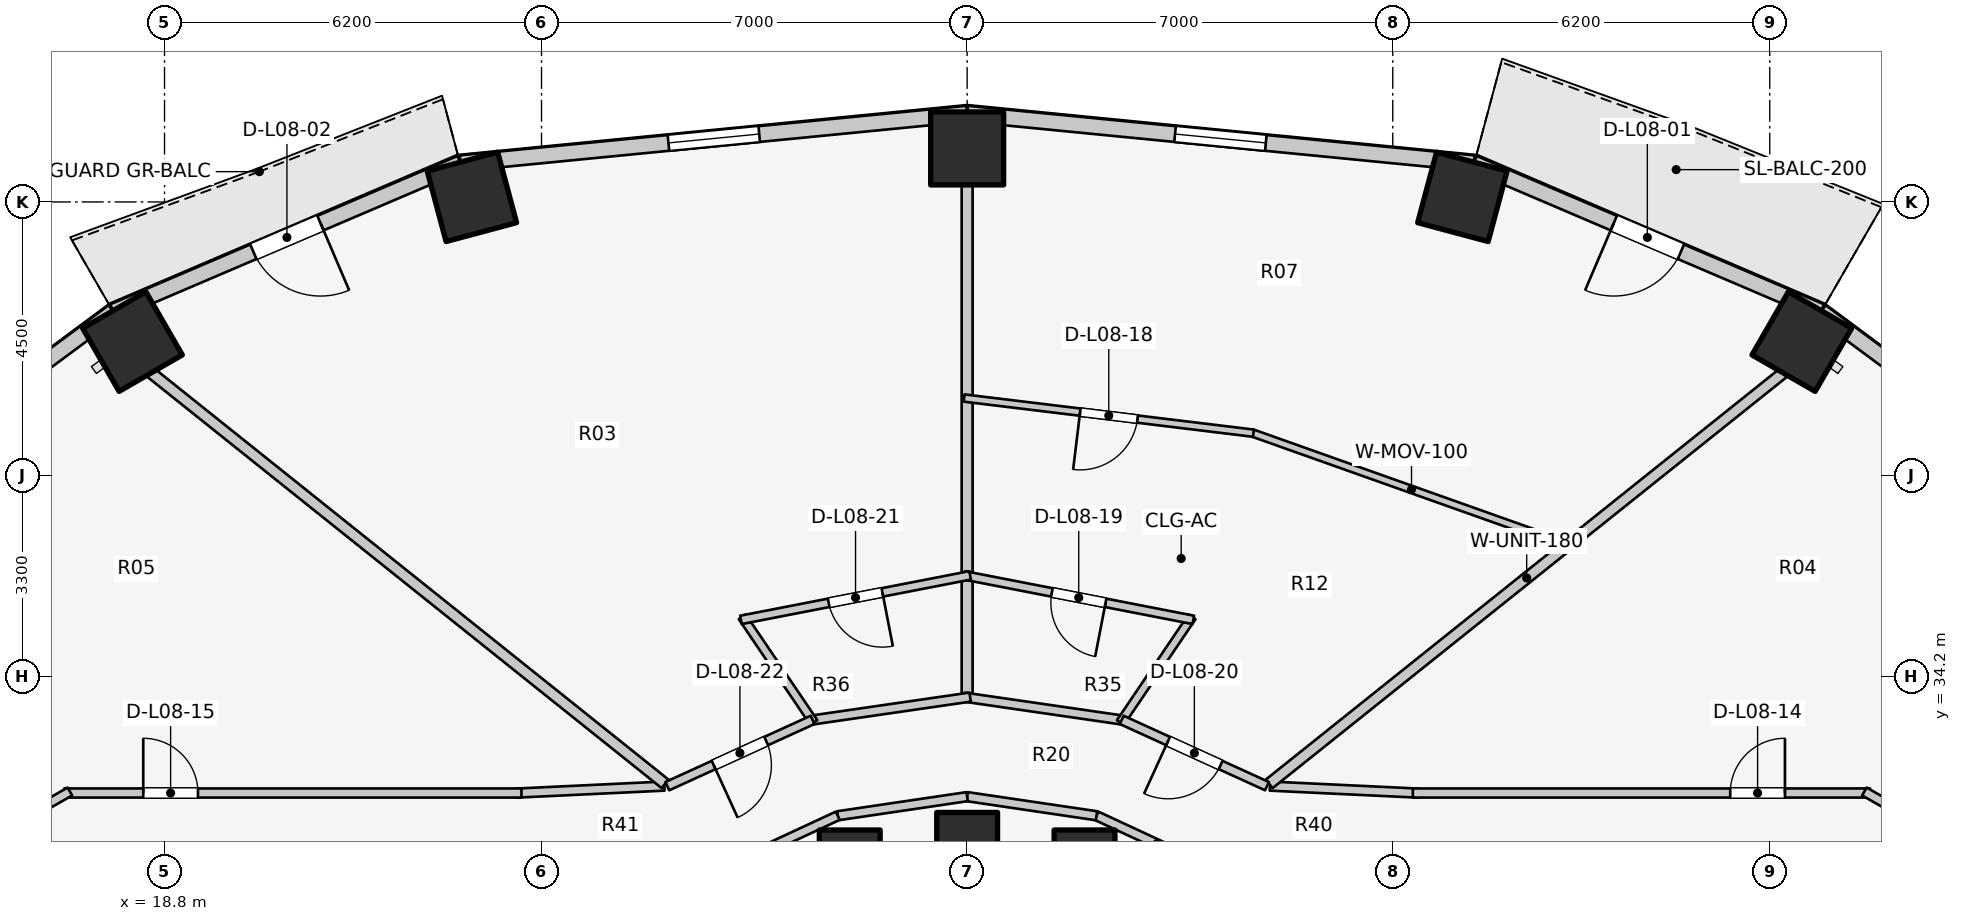
"""IFC4 building model, lengths in metres.
Left out: names, types, materials, properties, quantities, classifications, styles, units other than length and angle.
Written with IfcOpenShell. Run it as: python <this file> out.ifc"""

import sys

from ifc_helpers import new_model, si_unit, direction, frame, frame_2d, origin, origin_2d, place, context, subcontext, project, spatial, rectangle, extrude, element, fill, save


model = new_model("IFC4")
c1 = context("Model", 3, precision=1e-05, world=origin(), true_north=direction((0.0, 1.0)))
c2 = subcontext(c1, "Body", "Model", "MODEL_VIEW")
j1 = project(units=[si_unit("LENGTHUNIT", "METRE"), si_unit("PLANEANGLEUNIT", "RADIAN")], contexts=[c1])
p1 = place(None, origin())
s1 = spatial("IfcSite", under=j1, at=p1, CompositionType="ELEMENT")
p2 = place(p1, origin())
s2 = spatial("IfcBuilding", under=s1, at=p2, CompositionType="ELEMENT")
p3 = place(p2, frame((0.0, 0.0, 30.7)))
s3 = spatial("IfcBuildingStorey", under=s2, at=p3, CompositionType="ELEMENT", Elevation=30.7)
p4 = place(p3, frame((45.727, 39.704, 0.0), z_axis=(0.0, 0.0, 1.0), x_axis=(0.5, 0.866025403784, 0.0)))
e1 = element("IfcColumn", 1, at=p4, inside=s3, PredefinedType="COLUMN", context=c2, shape_type="SweptSolid", body=[
    extrude(rectangle(XDim=1.2, YDim=1.2, at=origin_2d()), origin(), (0.0, 0.0, 1.0), 3.1),
])
p5 = place(p3, frame((33.931, 31.172, 0.0), z_axis=(0.0, 0.0, 1.0), x_axis=(1.0, 0.0, 0.0)))
e2 = element("IfcColumn", 2, at=p5, inside=s3, PredefinedType="COLUMN", context=c2, shape_type="SweptSolid", body=[
    extrude(rectangle(XDim=1.0, YDim=1.0, at=origin_2d()), origin(), (0.0, 0.0, 1.0), 3.1),
])
p6 = place(p3, frame((40.145, 42.084, 0.0), z_axis=(0.0, 0.0, 1.0), x_axis=(0.258819045103, 0.965925826289, 0.0)))
e3 = element("IfcColumn", 3, at=p6, inside=s3, PredefinedType="COLUMN", context=c2, shape_type="SweptSolid", body=[
    extrude(rectangle(XDim=1.2, YDim=1.2, at=origin_2d()), origin(), (0.0, 0.0, 1.0), 3.1),
])
p7 = place(p3, frame((32.0, 31.46, 0.0), z_axis=(0.0, 0.0, 1.0), x_axis=(1.0, 0.0, 0.0)))
e4 = element("IfcColumn", 4, at=p7, inside=s3, PredefinedType="COLUMN", context=c2, shape_type="SweptSolid", body=[
    extrude(rectangle(XDim=1.0, YDim=1.0, at=origin_2d()), origin(), (0.0, 0.0, 1.0), 3.1),
])
p8 = place(p3, frame((32.0, 42.88, 0.0), z_axis=(0.0, 0.0, 1.0), x_axis=(0.0, 1.0, 0.0)))
e5 = element("IfcColumn", 5, at=p8, inside=s3, PredefinedType="COLUMN", context=c2, shape_type="SweptSolid", body=[
    extrude(rectangle(XDim=1.2, YDim=1.2, at=origin_2d()), origin(), (0.0, 0.0, 1.0), 3.1),
])
p9 = place(p3, frame((30.069, 31.172, 0.0), z_axis=(0.0, 0.0, 1.0), x_axis=(1.0, 0.0, 0.0)))
e6 = element("IfcColumn", 6, at=p9, inside=s3, PredefinedType="COLUMN", context=c2, shape_type="SweptSolid", body=[
    extrude(rectangle(XDim=1.0, YDim=1.0, at=origin_2d()), origin(), (0.0, 0.0, 1.0), 3.1),
])
for number, where, z_axis, x_axis in (
    (7, (23.855, 42.084, 0.0), (0.0, 0.0, 1.0), (-0.259, 0.966, 0.0)),
    (8, (18.273, 39.704, 0.0), (0.0, 0.0, 1.0), (-0.5, 0.866, 0.0)),
):
    element("IfcColumn", number, at=place(p3, frame(where, z_axis=z_axis, x_axis=x_axis)), inside=s3, PredefinedType="COLUMN", context=c2, shape_type="SweptSolid", body=[
        extrude(rectangle(XDim=1.2, YDim=1.2, at=origin_2d()), origin(), (0.0, 0.0, 1.0), 3.1),
    ])
p10 = place(p3, frame((50.405, 36.965, 0.0), z_axis=(0.0, 0.0, 1.0), x_axis=(-0.803477531792, 0.595335078679, 0.0)))
e9 = element("IfcWall", 9, at=p10, inside=s3, PredefinedType="STANDARD", context=c2, shape_type="SweptSolid", body=[
    extrude(rectangle(XDim=5.43, YDim=0.26, at=frame_2d((2.715, 0.0))), origin(), (0.0, 0.0, 1.0), 2.85),
])
p11 = place(p3, frame((46.042, 40.197, 0.0), z_axis=(0.0, 0.0, 1.0), x_axis=(-0.919612132394, 0.39282760335, 0.0)))
e10 = element("IfcWall", 10, at=p11, inside=s3, PredefinedType="STANDARD", context=c2, shape_type="SweptSolid", body=[
    extrude(rectangle(XDim=6.209, YDim=0.26, at=frame_2d((3.105, 0.0))), origin(), (0.0, 0.0, 1.0), 2.88),
])
p12 = place(p11, frame((2.505, 0.0, 0.0)))
e11 = element("IfcOpeningElement", 11, at=p12, cuts=e10, PredefinedType="OPENING", context=c2, shape_type="SweptSolid", body=[
    extrude(rectangle(XDim=1.2, YDim=2.2, at=frame_2d((0.6, 1.1))), frame((0.0, 0.14, 0.0), z_axis=(0.0, -1.0, 0.0), x_axis=(1.0, 0.0, 0.0)), (0.0, 0.0, 1.0), 0.28),
])
p13 = place(p3, frame((40.332, 42.636, 0.0), z_axis=(0.0, 0.0, 1.0), x_axis=(-0.995247718352, 0.097375454379, 0.0)))
e12 = element("IfcWall", 12, at=p13, inside=s3, PredefinedType="STANDARD", context=c2, shape_type="SweptSolid", body=[
    extrude(rectangle(XDim=8.372, YDim=0.26, at=frame_2d((4.186, 0.0))), origin(), (0.0, 0.0, 1.0), 2.85),
])
p14 = place(p13, frame((3.436, 0.0, 0.75)))
e13 = element("IfcOpeningElement", 13, at=p14, cuts=e12, PredefinedType="OPENING", context=c2, shape_type="SweptSolid", body=[
    extrude(rectangle(XDim=1.5, YDim=1.6, at=frame_2d((0.75, 0.8))), frame((0.0, 0.14, 0.0), z_axis=(0.0, -1.0, 0.0), x_axis=(1.0, 0.0, 0.0)), (0.0, 0.0, 1.0), 0.28),
])
p15 = place(p3, frame((32.0, 43.451, 0.0), z_axis=(0.0, 0.0, 1.0), x_axis=(-0.995247718352, -0.097375454379, 0.0)))
e14 = element("IfcWall", 14, at=p15, inside=s3, PredefinedType="STANDARD", context=c2, shape_type="SweptSolid", body=[
    extrude(rectangle(XDim=8.372, YDim=0.26, at=frame_2d((4.186, 0.0))), origin(), (0.0, 0.0, 1.0), 2.85),
])
p16 = place(p15, frame((3.436, 0.0, 0.75)))
e15 = element("IfcOpeningElement", 15, at=p16, cuts=e14, PredefinedType="OPENING", context=c2, shape_type="SweptSolid", body=[
    extrude(rectangle(XDim=1.5, YDim=1.6, at=frame_2d((0.75, 0.8))), frame((0.0, 0.14, 0.0), z_axis=(0.0, -1.0, 0.0), x_axis=(1.0, 0.0, 0.0)), (0.0, 0.0, 1.0), 0.28),
])
p17 = place(p3, frame((23.668, 42.636, 0.0), z_axis=(0.0, 0.0, 1.0), x_axis=(-0.919612132394, -0.39282760335, 0.0)))
e16 = element("IfcWall", 16, at=p17, inside=s3, PredefinedType="STANDARD", context=c2, shape_type="SweptSolid", body=[
    extrude(rectangle(XDim=6.209, YDim=0.26, at=frame_2d((3.105, 0.0))), origin(), (0.0, 0.0, 1.0), 2.88),
])
p18 = place(p17, frame((2.505, 0.0, 0.0)))
e17 = element("IfcOpeningElement", 17, at=p18, cuts=e16, PredefinedType="OPENING", context=c2, shape_type="SweptSolid", body=[
    extrude(rectangle(XDim=1.2, YDim=2.2, at=frame_2d((0.6, 1.1))), frame((0.0, 0.14, 0.0), z_axis=(0.0, -1.0, 0.0), x_axis=(1.0, 0.0, 0.0)), (0.0, 0.0, 1.0), 0.28),
])
p19 = place(p3, frame((17.958, 40.197, 0.0), z_axis=(0.0, 0.0, 1.0), x_axis=(-0.803477531792, -0.595335078679, 0.0)))
e18 = element("IfcWall", 18, at=p19, inside=s3, PredefinedType="STANDARD", context=c2, shape_type="SweptSolid", body=[
    extrude(rectangle(XDim=5.43, YDim=0.26, at=frame_2d((2.715, 0.0))), origin(), (0.0, 0.0, 1.0), 2.85),
])
p20 = place(p3, frame((36.11, 30.985, 0.0), z_axis=(0.0, 0.0, 1.0), x_axis=(-0.906943449489, 0.421252393975, 0.0)))
e19 = element("IfcWall", 19, at=p20, inside=s3, PredefinedType="PARTITIONING", context=c2, shape_type="SweptSolid", body=[
    extrude(rectangle(XDim=2.186, YDim=0.15, at=frame_2d((1.093, 0.0))), origin(), (0.0, 0.0, 1.0), 2.237),
])
for number, where, z_axis, x_axis in (
    (20, (34.127, 31.906, 0.0), (0.0, 0.0, 1.0), (-0.989, 0.146, 0.0)),
    (21, (32.0, 32.22, 0.0), (0.0, 0.0, 1.0), (-0.989, -0.146, 0.0)),
):
    element("IfcWall", number, at=place(p3, frame(where, z_axis=z_axis, x_axis=x_axis)), inside=s3, PredefinedType="PARTITIONING", context=c2, shape_type="SweptSolid", body=[
        extrude(rectangle(XDim=2.151, YDim=0.15, at=frame_2d((1.075, 0.0))), origin(), (0.0, 0.0, 1.0), 2.237),
    ])
p21 = place(p3, frame((29.873, 31.906, 0.0), z_axis=(0.0, 0.0, 1.0), x_axis=(-0.906943449489, -0.421252393975, 0.0)))
e22 = element("IfcWall", 22, at=p21, inside=s3, PredefinedType="PARTITIONING", context=c2, shape_type="SweptSolid", body=[
    extrude(rectangle(XDim=2.186, YDim=0.15, at=frame_2d((1.093, 0.0))), origin(), (0.0, 0.0, 1.0), 2.237),
])
p22 = place(p3, frame((36.98, 32.394, 0.0), z_axis=(0.0, 0.0, 1.0), x_axis=(0.998877427952, -0.047369651964, 0.0)))
e23 = element("IfcWall", 23, at=p22, inside=s3, PredefinedType="PARTITIONING", context=c2, shape_type="SweptSolid", body=[
    extrude(rectangle(XDim=2.433, YDim=0.15, at=frame_2d((1.216, 0.0))), origin(), (0.0, 0.0, 1.0), 2.237),
])
p23 = place(p3, frame((39.33, 32.28, 0.0), z_axis=(0.0, 0.0, 1.0), x_axis=(1.0, 0.0, 0.0)))
e24 = element("IfcWall", 24, at=p23, inside=s3, PredefinedType="PARTITIONING", context=c2, shape_type="SweptSolid", body=[
    extrude(rectangle(XDim=7.52, YDim=0.15, at=frame_2d((3.76, 0.0))), origin(), (0.0, 0.0, 1.0), 2.237),
])
p24 = place(p23, frame((5.22, 0.0, 0.0)))
e25 = element("IfcOpeningElement", 25, at=p24, cuts=e24, PredefinedType="OPENING", context=c2, shape_type="SweptSolid", body=[
    extrude(rectangle(XDim=0.9, YDim=2.1, at=frame_2d((0.45, 1.05))), frame((0.0, 0.085, 0.0), z_axis=(0.0, -1.0, 0.0), x_axis=(1.0, 0.0, 0.0)), (0.0, 0.0, 1.0), 0.17),
])
p25 = place(p3, frame((46.757, 32.305, 0.0), z_axis=(0.0, 0.0, 1.0), x_axis=(0.867991349648, -0.496579315857, 0.0)))
e26 = element("IfcWall", 26, at=p25, inside=s3, PredefinedType="PARTITIONING", context=c2, shape_type="SweptSolid", body=[
    extrude(rectangle(XDim=2.567, YDim=0.15, at=frame_2d((1.283, 0.0))), origin(), (0.0, 0.0, 1.0), 2.069),
])
p26 = place(p3, frame((27.02, 32.394, 0.0), z_axis=(0.0, 0.0, 1.0), x_axis=(-0.998877427952, -0.047369651964, 0.0)))
e27 = element("IfcWall", 27, at=p26, inside=s3, PredefinedType="PARTITIONING", context=c2, shape_type="SweptSolid", body=[
    extrude(rectangle(XDim=2.433, YDim=0.15, at=frame_2d((1.216, 0.0))), origin(), (0.0, 0.0, 1.0), 2.237),
])
p27 = place(p3, frame((17.15, 32.28, 0.0), z_axis=(0.0, 0.0, 1.0), x_axis=(1.0, 0.0, 0.0)))
e28 = element("IfcWall", 28, at=p27, inside=s3, PredefinedType="PARTITIONING", context=c2, shape_type="SweptSolid", body=[
    extrude(rectangle(XDim=7.52, YDim=0.15, at=frame_2d((3.76, 0.0))), origin(), (0.0, 0.0, 1.0), 2.237),
])
p28 = place(p27, frame((1.3, 0.0, 0.0)))
e29 = element("IfcOpeningElement", 29, at=p28, cuts=e28, PredefinedType="OPENING", context=c2, shape_type="SweptSolid", body=[
    extrude(rectangle(XDim=0.9, YDim=2.1, at=frame_2d((0.45, 1.05))), frame((0.0, 0.085, 0.0), z_axis=(0.0, -1.0, 0.0), x_axis=(1.0, 0.0, 0.0)), (0.0, 0.0, 1.0), 0.17),
])
p29 = place(p3, frame((17.243, 32.305, 0.0), z_axis=(0.0, 0.0, 1.0), x_axis=(-0.867991349648, -0.496579315857, 0.0)))
e30 = element("IfcWall", 30, at=p29, inside=s3, PredefinedType="PARTITIONING", context=c2, shape_type="SweptSolid", body=[
    extrude(rectangle(XDim=2.567, YDim=0.15, at=frame_2d((1.283, 0.0))), origin(), (0.0, 0.0, 1.0), 2.069),
])
p30 = place(p3, frame((36.968, 32.431, 0.0), z_axis=(0.0, 0.0, 1.0), x_axis=(0.781055486744, 0.624461629428, 0.0)))
e31 = element("IfcWall", 31, at=p30, inside=s3, PredefinedType="PARTITIONING", context=c2, shape_type="SweptSolid", body=[
    extrude(rectangle(XDim=10.843, YDim=0.18, at=frame_2d((5.422, 0.0))), origin(), (0.0, 0.0, 1.0), 2.237),
])
p31 = place(p3, frame((32.0, 33.905, 0.0), z_axis=(0.0, 0.0, 1.0), x_axis=(0.0, 1.0, 0.0)))
e32 = element("IfcWall", 32, at=p31, inside=s3, PredefinedType="PARTITIONING", context=c2, shape_type="SweptSolid", body=[
    extrude(rectangle(XDim=8.395, YDim=0.18, at=frame_2d((4.198, 0.0))), origin(), (0.0, 0.0, 1.0), 2.237),
])
p32 = place(p3, frame((27.032, 32.431, 0.0), z_axis=(0.0, 0.0, 1.0), x_axis=(-0.781055486744, 0.624461629428, 0.0)))
e33 = element("IfcWall", 33, at=p32, inside=s3, PredefinedType="PARTITIONING", context=c2, shape_type="SweptSolid", body=[
    extrude(rectangle(XDim=10.843, YDim=0.18, at=frame_2d((5.422, 0.0))), origin(), (0.0, 0.0, 1.0), 2.237),
])
p33 = place(p3, frame((41.928, 36.342, 0.0), z_axis=(0.0, 0.0, 1.0), x_axis=(-0.942369240096, 0.334574678243, 0.0)))
e34 = element("IfcWall", 34, at=p33, inside=s3, PredefinedType="MOVABLE", context=c2, shape_type="SweptSolid", body=[
    extrude(rectangle(XDim=5.559, YDim=0.12, at=frame_2d((2.779, 0.0))), origin(), (0.0, 0.0, 1.0), 2.237),
])
p34 = place(p3, frame((36.708, 38.197, 0.0), z_axis=(0.0, 0.0, 1.0), x_axis=(-0.992699076447, 0.120617343785, 0.0)))
e35 = element("IfcWall", 35, at=p34, inside=s3, PredefinedType="MOVABLE", context=c2, shape_type="SweptSolid", body=[
    extrude(rectangle(XDim=4.793, YDim=0.12, at=frame_2d((2.396, 0.0))), origin(), (0.0, 0.0, 1.0), 2.237),
])
p35 = place(p34, frame((1.922, 0.0, 0.0)))
e36 = element("IfcOpeningElement", 36, at=p35, cuts=e35, PredefinedType="OPENING", context=c2, shape_type="SweptSolid", body=[
    extrude(rectangle(XDim=0.95, YDim=2.1, at=frame_2d((0.475, 1.05))), frame((0.0, 0.07, 0.0), z_axis=(0.0, -1.0, 0.0), x_axis=(1.0, 0.0, 0.0)), (0.0, 0.0, 1.0), 0.14),
])
p36 = place(p3, frame((34.599, 33.473, 0.0), z_axis=(0.0, 0.0, 1.0), x_axis=(-0.989649898776, 0.143502884474, 0.0)))
e37 = element("IfcWall", 37, at=p36, inside=s3, PredefinedType="PARTITIONING", context=c2, shape_type="SweptSolid", body=[
    extrude(rectangle(XDim=2.676, YDim=0.15, at=frame_2d((1.338, 0.0))), origin(), (0.0, 0.0, 1.0), 2.237),
])
p37 = place(p3, frame((34.521, 33.439, 0.0), z_axis=(0.0, 0.0, 1.0), x_axis=(0.56056273171, 0.828111963335, 0.0)))
e38 = element("IfcWall", 38, at=p37, inside=s3, PredefinedType="PLUMBINGWALL", context=c2, shape_type="SweptSolid", body=[
    extrude(rectangle(XDim=2.1, YDim=0.14, at=frame_2d((1.05, 0.0))), origin(), (0.0, 0.0, 1.0), 2.855),
])
p38 = place(p3, frame((35.72, 35.127, 0.0), z_axis=(0.0, 0.0, 1.0), x_axis=(-0.981623000654, 0.190830512727, 0.0)))
e39 = element("IfcWall", 39, at=p38, inside=s3, PredefinedType="PLUMBINGWALL", context=c2, shape_type="SweptSolid", body=[
    extrude(rectangle(XDim=3.839, YDim=0.14, at=frame_2d((1.92, 0.0))), origin(), (0.0, 0.0, 1.0), 2.237),
])
p39 = place(p38, frame((1.47, 0.0, 0.0)))
e40 = element("IfcOpeningElement", 40, at=p39, cuts=e39, PredefinedType="OPENING", context=c2, shape_type="SweptSolid", body=[
    extrude(rectangle(XDim=0.9, YDim=2.1, at=frame_2d((0.45, 1.05))), frame((0.0, 0.08, 0.0), z_axis=(0.0, -1.0, 0.0), x_axis=(1.0, 0.0, 0.0)), (0.0, 0.0, 1.0), 0.16),
])
p40 = place(p3, frame((36.931, 32.393, 0.0), z_axis=(0.0, 0.0, 1.0), x_axis=(-0.909747571199, 0.415161843982, 0.0)))
e41 = element("IfcWall", 41, at=p40, inside=s3, PredefinedType="PARTITIONING", context=c2, shape_type="SweptSolid", body=[
    extrude(rectangle(XDim=2.625, YDim=0.15, at=frame_2d((1.312, 0.0))), origin(), (0.0, 0.0, 1.0), 2.237),
])
p41 = place(p40, frame((0.838, 0.0, 0.0)))
e42 = element("IfcOpeningElement", 42, at=p41, cuts=e41, PredefinedType="OPENING", context=c2, shape_type="SweptSolid", body=[
    extrude(rectangle(XDim=0.95, YDim=2.1, at=frame_2d((0.475, 1.05))), frame((0.0, 0.085, 0.0), z_axis=(0.0, -1.0, 0.0), x_axis=(1.0, 0.0, 0.0)), (0.0, 0.0, 1.0), 0.17),
])
p42 = place(p3, frame((32.05, 33.857, 0.0), z_axis=(0.0, 0.0, 1.0), x_axis=(-0.989649898776, -0.143502884474, 0.0)))
e43 = element("IfcWall", 43, at=p42, inside=s3, PredefinedType="PARTITIONING", context=c2, shape_type="SweptSolid", body=[
    extrude(rectangle(XDim=2.676, YDim=0.15, at=frame_2d((1.338, 0.0))), origin(), (0.0, 0.0, 1.0), 2.237),
])
p43 = place(p3, frame((29.479, 33.439, 0.0), z_axis=(0.0, 0.0, 1.0), x_axis=(-0.56056273171, 0.828111963335, 0.0)))
e44 = element("IfcWall", 44, at=p43, inside=s3, PredefinedType="PLUMBINGWALL", context=c2, shape_type="SweptSolid", body=[
    extrude(rectangle(XDim=2.1, YDim=0.14, at=frame_2d((1.05, 0.0))), origin(), (0.0, 0.0, 1.0), 2.855),
])
p44 = place(p3, frame((32.049, 35.86, 0.0), z_axis=(0.0, 0.0, 1.0), x_axis=(-0.981623000654, -0.190830512727, 0.0)))
e45 = element("IfcWall", 45, at=p44, inside=s3, PredefinedType="PLUMBINGWALL", context=c2, shape_type="SweptSolid", body=[
    extrude(rectangle(XDim=3.839, YDim=0.14, at=frame_2d((1.92, 0.0))), origin(), (0.0, 0.0, 1.0), 2.237),
])
p45 = place(p44, frame((1.47, 0.0, 0.0)))
e46 = element("IfcOpeningElement", 46, at=p45, cuts=e45, PredefinedType="OPENING", context=c2, shape_type="SweptSolid", body=[
    extrude(rectangle(XDim=0.9, YDim=2.1, at=frame_2d((0.45, 1.05))), frame((0.0, 0.08, 0.0), z_axis=(0.0, -1.0, 0.0), x_axis=(1.0, 0.0, 0.0)), (0.0, 0.0, 1.0), 0.16),
])
p46 = place(p3, frame((29.457, 33.482, 0.0), z_axis=(0.0, 0.0, 1.0), x_axis=(-0.909747571199, -0.415161843982, 0.0)))
e47 = element("IfcWall", 47, at=p46, inside=s3, PredefinedType="PARTITIONING", context=c2, shape_type="SweptSolid", body=[
    extrude(rectangle(XDim=2.625, YDim=0.15, at=frame_2d((1.312, 0.0))), origin(), (0.0, 0.0, 1.0), 2.237),
])
p47 = place(p46, frame((0.838, 0.0, 0.0)))
e48 = element("IfcOpeningElement", 48, at=p47, cuts=e47, PredefinedType="OPENING", context=c2, shape_type="SweptSolid", body=[
    extrude(rectangle(XDim=0.95, YDim=2.1, at=frame_2d((0.475, 1.05))), frame((0.0, 0.085, 0.0), z_axis=(0.0, -1.0, 0.0), x_axis=(1.0, 0.0, 0.0)), (0.0, 0.0, 1.0), 0.17),
])
p48 = place(p12, origin())
e49 = element("IfcDoor", 49, at=p48, inside=s3, OperationType="SINGLE_SWING_RIGHT", PredefinedType="DOOR", context=c2, shape_type="SweptSolid", body=[
    extrude(rectangle(XDim=1.2, YDim=2.2, at=frame_2d((0.6, 1.1))), frame((0.0, 0.025, 0.0), z_axis=(0.0, -1.0, 0.0), x_axis=(1.0, 0.0, 0.0)), (0.0, 0.0, 1.0), 0.05),
])
fill(e11, e49)
p49 = place(p14, origin())
e50 = element("IfcWindow", 50, at=p49, inside=s3, PartitioningType="SINGLE_PANEL", PredefinedType="WINDOW", context=c2, shape_type="SweptSolid", body=[
    extrude(rectangle(XDim=1.5, YDim=1.6, at=frame_2d((0.75, 0.8))), frame((0.0, 0.03, 0.0), z_axis=(0.0, -1.0, 0.0), x_axis=(1.0, 0.0, 0.0)), (0.0, 0.0, 1.0), 0.06),
])
fill(e13, e50)
p50 = place(p16, origin())
e51 = element("IfcWindow", 51, at=p50, inside=s3, PartitioningType="SINGLE_PANEL", PredefinedType="WINDOW", context=c2, shape_type="SweptSolid", body=[
    extrude(rectangle(XDim=1.5, YDim=1.6, at=frame_2d((0.75, 0.8))), frame((0.0, 0.03, 0.0), z_axis=(0.0, -1.0, 0.0), x_axis=(1.0, 0.0, 0.0)), (0.0, 0.0, 1.0), 0.06),
])
fill(e15, e51)
p51 = place(p18, origin())
e52 = element("IfcDoor", 52, at=p51, inside=s3, OperationType="SINGLE_SWING_LEFT", PredefinedType="DOOR", context=c2, shape_type="SweptSolid", body=[
    extrude(rectangle(XDim=1.2, YDim=2.2, at=frame_2d((0.6, 1.1))), frame((0.0, 0.025, 0.0), z_axis=(0.0, -1.0, 0.0), x_axis=(1.0, 0.0, 0.0)), (0.0, 0.0, 1.0), 0.05),
])
fill(e17, e52)
p52 = place(p24, origin())
e53 = element("IfcDoor", 53, at=p52, inside=s3, OperationType="SINGLE_SWING_RIGHT", PredefinedType="DOOR", context=c2, shape_type="SweptSolid", body=[
    extrude(rectangle(XDim=0.9, YDim=2.1, at=frame_2d((0.45, 1.05))), frame((0.0, 0.025, 0.0), z_axis=(0.0, -1.0, 0.0), x_axis=(1.0, 0.0, 0.0)), (0.0, 0.0, 1.0), 0.05),
])
fill(e25, e53)
p53 = place(p28, origin())
e54 = element("IfcDoor", 54, at=p53, inside=s3, OperationType="SINGLE_SWING_LEFT", PredefinedType="DOOR", context=c2, shape_type="SweptSolid", body=[
    extrude(rectangle(XDim=0.9, YDim=2.1, at=frame_2d((0.45, 1.05))), frame((0.0, 0.025, 0.0), z_axis=(0.0, -1.0, 0.0), x_axis=(1.0, 0.0, 0.0)), (0.0, 0.0, 1.0), 0.05),
])
fill(e29, e54)
p54 = place(p35, origin())
e55 = element("IfcDoor", 55, at=p54, inside=s3, OperationType="SINGLE_SWING_RIGHT", PredefinedType="DOOR", context=c2, shape_type="SweptSolid", body=[
    extrude(rectangle(XDim=0.95, YDim=2.1, at=frame_2d((0.475, 1.05))), frame((0.0, 0.025, 0.0), z_axis=(0.0, -1.0, 0.0), x_axis=(1.0, 0.0, 0.0)), (0.0, 0.0, 1.0), 0.05),
])
fill(e36, e55)
p55 = place(p39, origin())
e56 = element("IfcDoor", 56, at=p55, inside=s3, OperationType="SINGLE_SWING_LEFT", PredefinedType="DOOR", context=c2, shape_type="SweptSolid", body=[
    extrude(rectangle(XDim=0.9, YDim=2.1, at=frame_2d((0.45, 1.05))), frame((0.0, 0.025, 0.0), z_axis=(0.0, -1.0, 0.0), x_axis=(1.0, 0.0, 0.0)), (0.0, 0.0, 1.0), 0.05),
])
fill(e40, e56)
p56 = place(p41, origin())
e57 = element("IfcDoor", 57, at=p56, inside=s3, OperationType="SINGLE_SWING_RIGHT", PredefinedType="DOOR", context=c2, shape_type="SweptSolid", body=[
    extrude(rectangle(XDim=0.95, YDim=2.1, at=frame_2d((0.475, 1.05))), frame((0.0, 0.025, 0.0), z_axis=(0.0, -1.0, 0.0), x_axis=(1.0, 0.0, 0.0)), (0.0, 0.0, 1.0), 0.05),
])
fill(e42, e57)
p57 = place(p45, origin())
e58 = element("IfcDoor", 58, at=p57, inside=s3, OperationType="SINGLE_SWING_LEFT", PredefinedType="DOOR", context=c2, shape_type="SweptSolid", body=[
    extrude(rectangle(XDim=0.9, YDim=2.1, at=frame_2d((0.45, 1.05))), frame((0.0, 0.025, 0.0), z_axis=(0.0, -1.0, 0.0), x_axis=(1.0, 0.0, 0.0)), (0.0, 0.0, 1.0), 0.05),
])
fill(e46, e58)
p58 = place(p47, origin())
e59 = element("IfcDoor", 59, at=p58, inside=s3, OperationType="SINGLE_SWING_RIGHT", PredefinedType="DOOR", context=c2, shape_type="SweptSolid", body=[
    extrude(rectangle(XDim=0.95, YDim=2.1, at=frame_2d((0.475, 1.05))), frame((0.0, 0.025, 0.0), z_axis=(0.0, -1.0, 0.0), x_axis=(1.0, 0.0, 0.0)), (0.0, 0.0, 1.0), 0.05),
])
fill(e48, e59)
save(model, sys.argv[1])
